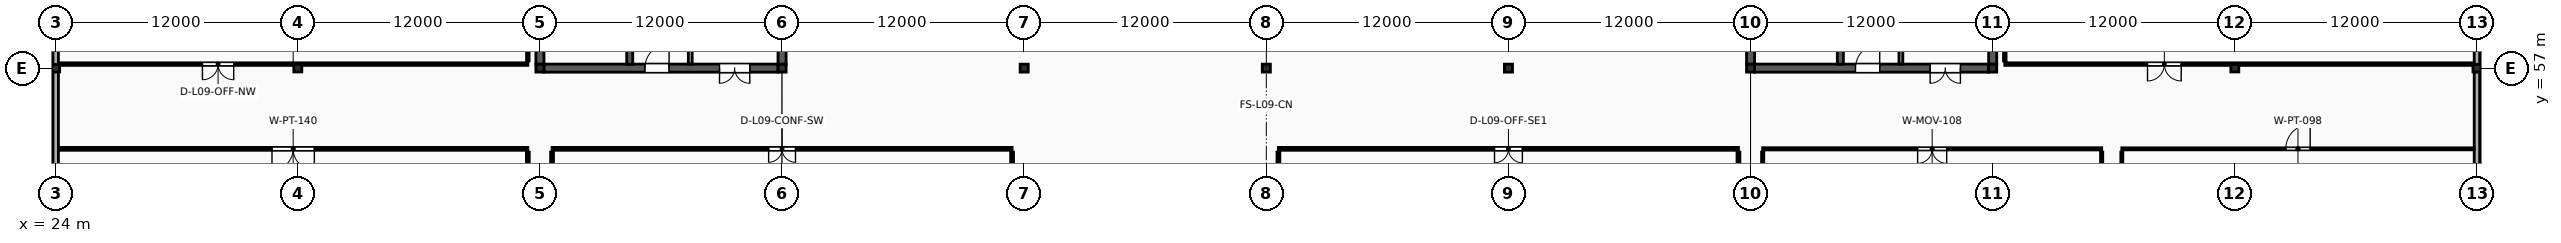
"""IFC4 building model, lengths in metres.
Left out: names, types, materials, properties, quantities, classifications, styles, units other than length and angle.
Written with IfcOpenShell. Run it as: python <this file> out.ifc"""

import sys

from ifc_helpers import new_model, si_unit, direction, frame, frame_2d, origin, origin_2d, place, context, subcontext, project, spatial, rectangle, i_section, extrude, element, fill, save


model = new_model("IFC4")
c1 = context("Model", 3, precision=1e-05, world=origin(), true_north=direction((0.0, 1.0)))
c2 = subcontext(c1, "Body", "Model", "MODEL_VIEW")
j1 = project(units=[si_unit("LENGTHUNIT", "METRE"), si_unit("PLANEANGLEUNIT", "RADIAN")], contexts=[c1])
p1 = place(None, origin())
s1 = spatial("IfcSite", under=j1, at=p1, CompositionType="ELEMENT")
p2 = place(p1, origin())
s2 = spatial("IfcBuilding", under=s1, at=p2, CompositionType="ELEMENT")
p3 = place(p2, frame((0.0, 0.0, 37.6)))
s3 = spatial("IfcBuildingStorey", under=s2, at=p3, CompositionType="ELEMENT", Elevation=37.6)
for number, where, z_axis, x_axis in (
    (1, (24.0, 57.0, 0.0), (0.0, 0.0, 1.0), (1.0, 0.0, 0.0)),
    (2, (36.0, 57.0, 0.0), (0.0, 0.0, 1.0), (1.0, 0.0, 0.0)),
):
    element("IfcColumn", number, at=place(p3, frame(where, z_axis=z_axis, x_axis=x_axis)), inside=s3, PredefinedType="COLUMN", context=c2, shape_type="SweptSolid", body=[
        extrude(i_section(OverallWidth=0.394, OverallDepth=0.375, WebThickness=0.017, FlangeThickness=0.028, FilletRadius=0.018, at=origin_2d()), origin(), (0.0, 0.0, 1.0), 4.0),
    ])
for number, where, z_axis, x_axis in (
    (3, (48.0, 57.0, 0.0), (0.0, 0.0, 1.0), (1.0, 0.0, 0.0)),
    (4, (60.0, 57.0, 0.0), (0.0, 0.0, 1.0), (1.0, 0.0, 0.0)),
    (5, (72.0, 57.0, 0.0), (0.0, 0.0, 1.0), (1.0, 0.0, 0.0)),
    (6, (84.0, 57.0, 0.0), (0.0, 0.0, 1.0), (1.0, 0.0, 0.0)),
    (7, (96.0, 57.0, 0.0), (0.0, 0.0, 1.0), (1.0, 0.0, 0.0)),
    (8, (108.0, 57.0, 0.0), (0.0, 0.0, 1.0), (1.0, 0.0, 0.0)),
    (9, (120.0, 57.0, 0.0), (0.0, 0.0, 1.0), (1.0, 0.0, 0.0)),
):
    element("IfcColumn", number, at=place(p3, frame(where, z_axis=z_axis, x_axis=x_axis)), inside=s3, PredefinedType="COLUMN", context=c2, shape_type="SweptSolid", body=[
        extrude(i_section(OverallWidth=0.399, OverallDepth=0.393, WebThickness=0.023, FlangeThickness=0.037, FilletRadius=0.018, at=origin_2d()), origin(), (0.0, 0.0, 1.0), 4.0),
    ])
for number, where, z_axis, x_axis in (
    (10, (132.0, 57.0, 0.0), (0.0, 0.0, 1.0), (1.0, 0.0, 0.0)),
    (11, (144.0, 57.0, 0.0), (0.0, 0.0, 1.0), (1.0, 0.0, 0.0)),
):
    element("IfcColumn", number, at=place(p3, frame(where, z_axis=z_axis, x_axis=x_axis)), inside=s3, PredefinedType="COLUMN", context=c2, shape_type="SweptSolid", body=[
        extrude(i_section(OverallWidth=0.394, OverallDepth=0.375, WebThickness=0.017, FlangeThickness=0.028, FilletRadius=0.018, at=origin_2d()), origin(), (0.0, 0.0, 1.0), 4.0),
    ])
p4 = place(p3, frame((48.197, 57.0, 0.0), z_axis=(0.0, 0.0, 1.0), x_axis=(1.0, 0.0, 0.0)))
e12 = element("IfcWall", 12, at=p4, inside=s3, PredefinedType="SHEAR", context=c2, shape_type="SweptSolid", body=[
    extrude(rectangle(XDim=11.607, YDim=0.4, at=frame_2d((5.803, 0.0))), origin(), (0.0, 0.0, 1.0), 3.838),
])
p5 = place(p4, frame((5.004, 0.0, 0.0)))
e13 = element("IfcOpeningElement", 13, at=p5, cuts=e12, PredefinedType="OPENING", context=c2, shape_type="SweptSolid", body=[
    extrude(rectangle(XDim=1.2, YDim=2.2, at=frame_2d((0.6, 1.1))), frame((0.0, 0.215, 0.0), z_axis=(0.0, -1.0, 0.0), x_axis=(1.0, 0.0, 0.0)), (0.0, 0.0, 1.0), 0.43),
])
p6 = place(p4, frame((8.703, 0.0, 0.0)))
e14 = element("IfcOpeningElement", 14, at=p6, cuts=e12, PredefinedType="OPENING", context=c2, shape_type="SweptSolid", body=[
    extrude(rectangle(XDim=1.5, YDim=2.25, at=frame_2d((0.75, 1.125))), frame((0.0, 0.215, 0.0), z_axis=(0.0, -1.0, 0.0), x_axis=(1.0, 0.0, 0.0)), (0.0, 0.0, 1.0), 0.43),
])
for number, where, z_axis, x_axis in (
    (15, (48.0, 57.194, 0.0), (0.0, 0.0, 1.0), (0.0, 1.0, 0.0)),
    (16, (60.0, 57.194, 0.0), (0.0, 0.0, 1.0), (0.0, 1.0, 0.0)),
):
    element("IfcWall", number, at=place(p3, frame(where, z_axis=z_axis, x_axis=x_axis)), inside=s3, PredefinedType="SHEAR", context=c2, shape_type="SweptSolid", body=[
        extrude(rectangle(XDim=11.613, YDim=0.4, at=frame_2d((5.806, 0.0))), origin(), (0.0, 0.0, 1.0), 3.838),
    ])
p7 = place(p3, frame((52.45, 57.197, 0.0), z_axis=(0.0, 0.0, 1.0), x_axis=(0.0, 1.0, 0.0)))
e17 = element("IfcWall", 17, at=p7, inside=s3, PredefinedType="SHEAR", context=c2, shape_type="SweptSolid", body=[
    extrude(rectangle(XDim=11.606, YDim=0.3, at=frame_2d((5.803, 0.0))), origin(), (0.0, 0.0, 1.0), 3.838),
])
p8 = place(p7, frame((0.9, 0.0, 0.0)))
e18 = element("IfcOpeningElement", 18, at=p8, cuts=e17, PredefinedType="OPENING", context=c2, shape_type="SweptSolid", body=[
    extrude(rectangle(XDim=1.1, YDim=2.2, at=frame_2d((0.55, 1.1))), frame((0.0, 0.165, 0.0), z_axis=(0.0, -1.0, 0.0), x_axis=(1.0, 0.0, 0.0)), (0.0, 0.0, 1.0), 0.33),
])
p9 = place(p3, frame((55.45, 57.2, 0.0), z_axis=(0.0, 0.0, 1.0), x_axis=(0.0, 1.0, 0.0)))
e19 = element("IfcWall", 19, at=p9, inside=s3, PredefinedType="SOLIDWALL", context=c2, shape_type="SweptSolid", body=[
    extrude(rectangle(XDim=8.48, YDim=0.19, at=frame_2d((4.24, 0.0))), origin(), (0.0, 0.0, 1.0), 3.828),
])
p10 = place(p9, frame((3.6, 0.0, 0.0)))
e20 = element("IfcOpeningElement", 20, at=p10, cuts=e19, PredefinedType="OPENING", context=c2, shape_type="SweptSolid", body=[
    extrude(rectangle(XDim=1.04, YDim=2.18, at=frame_2d((0.52, 1.09))), frame((0.0, 0.11, 0.0), z_axis=(0.0, -1.0, 0.0), x_axis=(1.0, 0.0, 0.0)), (0.0, 0.0, 1.0), 0.22),
])
p11 = place(p3, frame((108.197, 57.0, 0.0), z_axis=(0.0, 0.0, 1.0), x_axis=(1.0, 0.0, 0.0)))
e21 = element("IfcWall", 21, at=p11, inside=s3, PredefinedType="SHEAR", context=c2, shape_type="SweptSolid", body=[
    extrude(rectangle(XDim=11.607, YDim=0.4, at=frame_2d((5.803, 0.0))), origin(), (0.0, 0.0, 1.0), 3.838),
])
p12 = place(p11, frame((5.004, 0.0, 0.0)))
e22 = element("IfcOpeningElement", 22, at=p12, cuts=e21, PredefinedType="OPENING", context=c2, shape_type="SweptSolid", body=[
    extrude(rectangle(XDim=1.2, YDim=2.2, at=frame_2d((0.6, 1.1))), frame((0.0, 0.215, 0.0), z_axis=(0.0, -1.0, 0.0), x_axis=(1.0, 0.0, 0.0)), (0.0, 0.0, 1.0), 0.43),
])
p13 = place(p11, frame((8.704, 0.0, 0.0)))
e23 = element("IfcOpeningElement", 23, at=p13, cuts=e21, PredefinedType="OPENING", context=c2, shape_type="SweptSolid", body=[
    extrude(rectangle(XDim=1.5, YDim=2.25, at=frame_2d((0.75, 1.125))), frame((0.0, 0.215, 0.0), z_axis=(0.0, -1.0, 0.0), x_axis=(1.0, 0.0, 0.0)), (0.0, 0.0, 1.0), 0.43),
])
for number, where, z_axis, x_axis in (
    (24, (108.0, 57.194, 0.0), (0.0, 0.0, 1.0), (0.0, 1.0, 0.0)),
    (25, (120.0, 57.194, 0.0), (0.0, 0.0, 1.0), (0.0, 1.0, 0.0)),
):
    element("IfcWall", number, at=place(p3, frame(where, z_axis=z_axis, x_axis=x_axis)), inside=s3, PredefinedType="SHEAR", context=c2, shape_type="SweptSolid", body=[
        extrude(rectangle(XDim=11.613, YDim=0.4, at=frame_2d((5.806, 0.0))), origin(), (0.0, 0.0, 1.0), 3.838),
    ])
p14 = place(p3, frame((112.45, 57.197, 0.0), z_axis=(0.0, 0.0, 1.0), x_axis=(0.0, 1.0, 0.0)))
e26 = element("IfcWall", 26, at=p14, inside=s3, PredefinedType="SHEAR", context=c2, shape_type="SweptSolid", body=[
    extrude(rectangle(XDim=11.606, YDim=0.3, at=frame_2d((5.803, 0.0))), origin(), (0.0, 0.0, 1.0), 3.838),
])
p15 = place(p14, frame((0.9, 0.0, 0.0)))
e27 = element("IfcOpeningElement", 27, at=p15, cuts=e26, PredefinedType="OPENING", context=c2, shape_type="SweptSolid", body=[
    extrude(rectangle(XDim=1.1, YDim=2.2, at=frame_2d((0.55, 1.1))), frame((0.0, 0.165, 0.0), z_axis=(0.0, -1.0, 0.0), x_axis=(1.0, 0.0, 0.0)), (0.0, 0.0, 1.0), 0.33),
])
p16 = place(p3, frame((115.45, 57.2, 0.0), z_axis=(0.0, 0.0, 1.0), x_axis=(0.0, 1.0, 0.0)))
e28 = element("IfcWall", 28, at=p16, inside=s3, PredefinedType="SOLIDWALL", context=c2, shape_type="SweptSolid", body=[
    extrude(rectangle(XDim=8.48, YDim=0.19, at=frame_2d((4.24, 0.0))), origin(), (0.0, 0.0, 1.0), 3.828),
])
p17 = place(p16, frame((3.6, 0.0, 0.0)))
e29 = element("IfcOpeningElement", 29, at=p17, cuts=e28, PredefinedType="OPENING", context=c2, shape_type="SweptSolid", body=[
    extrude(rectangle(XDim=1.04, YDim=2.18, at=frame_2d((0.52, 1.09))), frame((0.0, 0.11, 0.0), z_axis=(0.0, -1.0, 0.0), x_axis=(1.0, 0.0, 0.0)), (0.0, 0.0, 1.0), 0.22),
])
p18 = place(p3, frame((24.0, 45.186, 0.0), z_axis=(0.0, 0.0, 1.0), x_axis=(0.0, 1.0, 0.0)))
e30 = element("IfcWall", 30, at=p18, inside=s3, PredefinedType="SOLIDWALL", context=c2, shape_type="SweptSolid", body=[
    extrude(rectangle(XDim=11.629, YDim=0.27, at=frame_2d((5.814, 0.0))), origin(), (0.0, 0.0, 1.0), 3.291),
])
p19 = place(p18, frame((4.994, 0.0, 0.78)))
e31 = element("IfcOpeningElement", 31, at=p19, cuts=e30, PredefinedType="OPENING", context=c2, shape_type="SweptSolid", body=[
    extrude(rectangle(XDim=1.64, YDim=1.74, at=frame_2d((0.82, 0.87))), frame((0.0, 0.15, 0.0), z_axis=(0.0, -1.0, 0.0), x_axis=(1.0, 0.0, 0.0)), (0.0, 0.0, 1.0), 0.3),
])
p20 = place(p3, frame((24.0, 57.186, 0.0), z_axis=(0.0, 0.0, 1.0), x_axis=(0.0, 1.0, 0.0)))
e32 = element("IfcWall", 32, at=p20, inside=s3, PredefinedType="SOLIDWALL", context=c2, shape_type="SweptSolid", body=[
    extrude(rectangle(XDim=11.629, YDim=0.27, at=frame_2d((5.814, 0.0))), origin(), (0.0, 0.0, 1.0), 3.291),
])
p21 = place(p20, frame((4.885, 0.0, 0.78)))
e33 = element("IfcOpeningElement", 33, at=p21, cuts=e32, PredefinedType="OPENING", context=c2, shape_type="SweptSolid", body=[
    extrude(rectangle(XDim=1.86, YDim=1.74, at=frame_2d((0.93, 0.87))), frame((0.0, 0.15, 0.0), z_axis=(0.0, -1.0, 0.0), x_axis=(1.0, 0.0, 0.0)), (0.0, 0.0, 1.0), 0.3),
])
p22 = place(p3, frame((144.0, 45.186, 0.0), z_axis=(0.0, 0.0, 1.0), x_axis=(0.0, 1.0, 0.0)))
e34 = element("IfcWall", 34, at=p22, inside=s3, PredefinedType="SOLIDWALL", context=c2, shape_type="SweptSolid", body=[
    extrude(rectangle(XDim=11.629, YDim=0.27, at=frame_2d((5.814, 0.0))), origin(), (0.0, 0.0, 1.0), 3.291),
])
p23 = place(p22, frame((4.704, 0.0, 0.78)))
e35 = element("IfcOpeningElement", 35, at=p23, cuts=e34, PredefinedType="OPENING", context=c2, shape_type="SweptSolid", body=[
    extrude(rectangle(XDim=2.22, YDim=1.74, at=frame_2d((1.11, 0.87))), frame((0.0, 0.15, 0.0), z_axis=(0.0, -1.0, 0.0), x_axis=(1.0, 0.0, 0.0)), (0.0, 0.0, 1.0), 0.3),
])
p24 = place(p3, frame((144.0, 57.186, 0.0), z_axis=(0.0, 0.0, 1.0), x_axis=(0.0, 1.0, 0.0)))
e36 = element("IfcWall", 36, at=p24, inside=s3, PredefinedType="SOLIDWALL", context=c2, shape_type="SweptSolid", body=[
    extrude(rectangle(XDim=11.629, YDim=0.27, at=frame_2d((5.814, 0.0))), origin(), (0.0, 0.0, 1.0), 3.291),
])
p25 = place(p24, frame((4.614, 0.0, 0.78)))
e37 = element("IfcOpeningElement", 37, at=p25, cuts=e36, PredefinedType="OPENING", context=c2, shape_type="SweptSolid", body=[
    extrude(rectangle(XDim=2.4, YDim=1.74, at=frame_2d((1.2, 0.87))), frame((0.0, 0.15, 0.0), z_axis=(0.0, -1.0, 0.0), x_axis=(1.0, 0.0, 0.0)), (0.0, 0.0, 1.0), 0.3),
])
p26 = place(p3, frame((24.14, 53.0, 0.0), z_axis=(0.0, 0.0, 1.0), x_axis=(1.0, 0.0, 0.0)))
e38 = element("IfcWall", 38, at=p26, inside=s3, PredefinedType="PARTITIONING", context=c2, shape_type="SweptSolid", body=[
    extrude(rectangle(XDim=23.26, YDim=0.14, at=frame_2d((11.63, 0.0))), origin(), (0.0, 0.0, 1.0), 2.88),
])
p27 = place(p26, frame((10.58, 0.0, 0.0)))
e39 = element("IfcOpeningElement", 39, at=p27, cuts=e38, PredefinedType="OPENING", context=c2, shape_type="SweptSolid", body=[
    extrude(rectangle(XDim=2.1, YDim=2.47, at=frame_2d((1.05, 1.235))), frame((0.0, 0.085, 0.0), z_axis=(0.0, -1.0, 0.0), x_axis=(1.0, 0.0, 0.0)), (0.0, 0.0, 1.0), 0.17),
])
p28 = place(p3, frame((47.4, 27.14, 0.0), z_axis=(0.0, 0.0, 1.0), x_axis=(0.0, 1.0, 0.0)))
e40 = element("IfcWall", 40, at=p28, inside=s3, PredefinedType="PARTITIONING", context=c2, shape_type="SweptSolid", body=[
    extrude(rectangle(XDim=25.7, YDim=0.14, at=frame_2d((12.85, 0.0))), origin(), (0.0, 0.0, 1.0), 2.88),
])
p29 = place(p3, frame((48.6, 53.0, 0.0), z_axis=(0.0, 0.0, 1.0), x_axis=(1.0, 0.0, 0.0)))
e41 = element("IfcWall", 41, at=p29, inside=s3, PredefinedType="PARTITIONING", context=c2, shape_type="SweptSolid", body=[
    extrude(rectangle(XDim=22.8, YDim=0.14, at=frame_2d((11.4, 0.0))), origin(), (0.0, 0.0, 1.0), 2.88),
])
p30 = place(p29, frame((10.735, 0.0, 0.0)))
e42 = element("IfcOpeningElement", 42, at=p30, cuts=e41, PredefinedType="OPENING", context=c2, shape_type="SweptSolid", body=[
    extrude(rectangle(XDim=1.33, YDim=2.2, at=frame_2d((0.665, 1.1))), frame((0.0, 0.085, 0.0), z_axis=(0.0, -1.0, 0.0), x_axis=(1.0, 0.0, 0.0)), (0.0, 0.0, 1.0), 0.17),
])
for number, where, z_axis, x_axis in (
    (43, (48.6, 27.14, 0.0), (0.0, 0.0, 1.0), (0.0, 1.0, 0.0)),
    (44, (71.4, 27.14, 0.0), (0.0, 0.0, 1.0), (0.0, 1.0, 0.0)),
):
    element("IfcWall", number, at=place(p3, frame(where, z_axis=z_axis, x_axis=x_axis)), inside=s3, PredefinedType="PARTITIONING", context=c2, shape_type="SweptSolid", body=[
        extrude(rectangle(XDim=25.7, YDim=0.14, at=frame_2d((12.85, 0.0))), origin(), (0.0, 0.0, 1.0), 2.88),
    ])
p31 = place(p3, frame((84.6, 53.0, 0.0), z_axis=(0.0, 0.0, 1.0), x_axis=(1.0, 0.0, 0.0)))
e45 = element("IfcWall", 45, at=p31, inside=s3, PredefinedType="PARTITIONING", context=c2, shape_type="SweptSolid", body=[
    extrude(rectangle(XDim=22.8, YDim=0.14, at=frame_2d((11.4, 0.0))), origin(), (0.0, 0.0, 1.0), 2.88),
])
p32 = place(p31, frame((10.71, 0.0, 0.0)))
e46 = element("IfcOpeningElement", 46, at=p32, cuts=e45, PredefinedType="OPENING", context=c2, shape_type="SweptSolid", body=[
    extrude(rectangle(XDim=1.38, YDim=2.23, at=frame_2d((0.69, 1.115))), frame((0.0, 0.085, 0.0), z_axis=(0.0, -1.0, 0.0), x_axis=(1.0, 0.0, 0.0)), (0.0, 0.0, 1.0), 0.17),
])
for number, where, z_axis, x_axis in (
    (47, (84.6, 27.14, 0.0), (0.0, 0.0, 1.0), (0.0, 1.0, 0.0)),
    (48, (107.4, 27.14, 0.0), (0.0, 0.0, 1.0), (0.0, 1.0, 0.0)),
):
    element("IfcWall", number, at=place(p3, frame(where, z_axis=z_axis, x_axis=x_axis)), inside=s3, PredefinedType="PARTITIONING", context=c2, shape_type="SweptSolid", body=[
        extrude(rectangle(XDim=25.7, YDim=0.14, at=frame_2d((12.85, 0.0))), origin(), (0.0, 0.0, 1.0), 2.88),
    ])
p33 = place(p3, frame((108.6, 53.0, 0.0), z_axis=(0.0, 0.0, 1.0), x_axis=(1.0, 0.0, 0.0)))
e49 = element("IfcWall", 49, at=p33, inside=s3, PredefinedType="MOVABLE", context=c2, shape_type="SweptSolid", body=[
    extrude(rectangle(XDim=16.8, YDim=0.108, at=frame_2d((8.4, 0.0))), origin(), (0.0, 0.0, 1.0), 2.88),
])
p34 = place(p33, frame((7.68, 0.0, 0.0)))
e50 = element("IfcOpeningElement", 50, at=p34, cuts=e49, PredefinedType="OPENING", context=c2, shape_type="SweptSolid", body=[
    extrude(rectangle(XDim=1.44, YDim=2.26, at=frame_2d((0.72, 1.13))), frame((0.0, 0.069, 0.0), z_axis=(0.0, -1.0, 0.0), x_axis=(1.0, 0.0, 0.0)), (0.0, 0.0, 1.0), 0.138),
])
for number, where, z_axis, x_axis in (
    (51, (108.6, 27.14, 0.0), (0.0, 0.0, 1.0), (0.0, 1.0, 0.0)),
    (52, (125.4, 27.14, 0.0), (0.0, 0.0, 1.0), (0.0, 1.0, 0.0)),
):
    element("IfcWall", number, at=place(p3, frame(where, z_axis=z_axis, x_axis=x_axis)), inside=s3, PredefinedType="MOVABLE", context=c2, shape_type="SweptSolid", body=[
        extrude(rectangle(XDim=25.7, YDim=0.108, at=frame_2d((12.85, 0.0))), origin(), (0.0, 0.0, 1.0), 2.88),
    ])
p35 = place(p3, frame((126.4, 53.0, 0.0), z_axis=(0.0, 0.0, 1.0), x_axis=(1.0, 0.0, 0.0)))
e53 = element("IfcWall", 53, at=p35, inside=s3, PredefinedType="PARTITIONING", context=c2, shape_type="SweptSolid", body=[
    extrude(rectangle(XDim=17.46, YDim=0.098, at=frame_2d((8.73, 0.0))), origin(), (0.0, 0.0, 1.0), 2.88),
])
p36 = place(p35, frame((8.125, 0.0, 0.0)))
e54 = element("IfcOpeningElement", 54, at=p36, cuts=e53, PredefinedType="OPENING", context=c2, shape_type="SweptSolid", body=[
    extrude(rectangle(XDim=1.21, YDim=2.25, at=frame_2d((0.605, 1.125))), frame((0.0, 0.064, 0.0), z_axis=(0.0, -1.0, 0.0), x_axis=(1.0, 0.0, 0.0)), (0.0, 0.0, 1.0), 0.128),
])
p37 = place(p3, frame((126.4, 27.14, 0.0), z_axis=(0.0, 0.0, 1.0), x_axis=(0.0, 1.0, 0.0)))
e55 = element("IfcWall", 55, at=p37, inside=s3, PredefinedType="PARTITIONING", context=c2, shape_type="SweptSolid", body=[
    extrude(rectangle(XDim=25.7, YDim=0.098, at=frame_2d((12.85, 0.0))), origin(), (0.0, 0.0, 1.0), 2.88),
])
p38 = place(p3, frame((24.14, 57.2, 0.0), z_axis=(0.0, 0.0, 1.0), x_axis=(1.0, 0.0, 0.0)))
e56 = element("IfcWall", 56, at=p38, inside=s3, PredefinedType="PARTITIONING", context=c2, shape_type="SweptSolid", body=[
    extrude(rectangle(XDim=23.26, YDim=0.125, at=frame_2d((11.63, 0.0))), origin(), (0.0, 0.0, 1.0), 2.88),
])
p39 = place(p38, frame((7.133, 0.0, 0.0)))
e57 = element("IfcOpeningElement", 57, at=p39, cuts=e56, PredefinedType="OPENING", context=c2, shape_type="SweptSolid", body=[
    extrude(rectangle(XDim=1.55, YDim=2.31, at=frame_2d((0.775, 1.155))), frame((0.0, 0.077, 0.0), z_axis=(0.0, -1.0, 0.0), x_axis=(1.0, 0.0, 0.0)), (0.0, 0.0, 1.0), 0.155),
])
p40 = place(p3, frame((47.4, 57.36, 0.0), z_axis=(0.0, 0.0, 1.0), x_axis=(0.0, 1.0, 0.0)))
e58 = element("IfcWall", 58, at=p40, inside=s3, PredefinedType="PARTITIONING", context=c2, shape_type="SweptSolid", body=[
    extrude(rectangle(XDim=11.5, YDim=0.125, at=frame_2d((5.75, 0.0))), origin(), (0.0, 0.0, 1.0), 2.88),
])
p41 = place(p3, frame((120.6, 57.2, 0.0), z_axis=(0.0, 0.0, 1.0), x_axis=(1.0, 0.0, 0.0)))
e59 = element("IfcWall", 59, at=p41, inside=s3, PredefinedType="PARTITIONING", context=c2, shape_type="SweptSolid", body=[
    extrude(rectangle(XDim=23.26, YDim=0.125, at=frame_2d((11.63, 0.0))), origin(), (0.0, 0.0, 1.0), 2.88),
])
p42 = place(p41, frame((7.073, 0.0, 0.0)))
e60 = element("IfcOpeningElement", 60, at=p42, cuts=e59, PredefinedType="OPENING", context=c2, shape_type="SweptSolid", body=[
    extrude(rectangle(XDim=1.67, YDim=2.35, at=frame_2d((0.835, 1.175))), frame((0.0, 0.077, 0.0), z_axis=(0.0, -1.0, 0.0), x_axis=(1.0, 0.0, 0.0)), (0.0, 0.0, 1.0), 0.155),
])
p43 = place(p3, frame((120.6, 57.36, 0.0), z_axis=(0.0, 0.0, 1.0), x_axis=(0.0, 1.0, 0.0)))
e61 = element("IfcWall", 61, at=p43, inside=s3, PredefinedType="PARTITIONING", context=c2, shape_type="SweptSolid", body=[
    extrude(rectangle(XDim=11.5, YDim=0.125, at=frame_2d((5.75, 0.0))), origin(), (0.0, 0.0, 1.0), 2.88),
])
p44 = place(p5, origin())
e62 = element("IfcDoor", 62, at=p44, inside=s3, OperationType="SINGLE_SWING_RIGHT", PredefinedType="DOOR", context=c2, shape_type="SweptSolid", body=[
    extrude(rectangle(XDim=1.2, YDim=2.2, at=frame_2d((0.6, 1.1))), frame((0.0, 0.025, 0.0), z_axis=(0.0, -1.0, 0.0), x_axis=(1.0, 0.0, 0.0)), (0.0, 0.0, 1.0), 0.05),
])
fill(e13, e62)
p45 = place(p6, origin())
e63 = element("IfcDoor", 63, at=p45, inside=s3, OperationType="DOUBLE_DOOR_SINGLE_SWING", PredefinedType="DOOR", context=c2, shape_type="SweptSolid", body=[
    extrude(rectangle(XDim=1.5, YDim=2.25, at=frame_2d((0.75, 1.125))), frame((0.0, 0.025, 0.0), z_axis=(0.0, -1.0, 0.0), x_axis=(1.0, 0.0, 0.0)), (0.0, 0.0, 1.0), 0.05),
])
fill(e14, e63)
p46 = place(p12, origin())
e64 = element("IfcDoor", 64, at=p46, inside=s3, OperationType="SINGLE_SWING_RIGHT", PredefinedType="DOOR", context=c2, shape_type="SweptSolid", body=[
    extrude(rectangle(XDim=1.2, YDim=2.2, at=frame_2d((0.6, 1.1))), frame((0.0, 0.025, 0.0), z_axis=(0.0, -1.0, 0.0), x_axis=(1.0, 0.0, 0.0)), (0.0, 0.0, 1.0), 0.05),
])
fill(e22, e64)
p47 = place(p13, origin())
e65 = element("IfcDoor", 65, at=p47, inside=s3, OperationType="DOUBLE_DOOR_SINGLE_SWING", PredefinedType="DOOR", context=c2, shape_type="SweptSolid", body=[
    extrude(rectangle(XDim=1.5, YDim=2.25, at=frame_2d((0.75, 1.125))), frame((0.0, 0.025, 0.0), z_axis=(0.0, -1.0, 0.0), x_axis=(1.0, 0.0, 0.0)), (0.0, 0.0, 1.0), 0.05),
])
fill(e23, e65)
p48 = place(p27, origin())
e66 = element("IfcDoor", 66, at=p48, inside=s3, OperationType="DOUBLE_DOOR_SINGLE_SWING", PredefinedType="DOOR", context=c2, shape_type="SweptSolid", body=[
    extrude(rectangle(XDim=2.1, YDim=2.47, at=frame_2d((1.05, 1.235))), frame((0.0, 0.025, 0.0), z_axis=(0.0, -1.0, 0.0), x_axis=(1.0, 0.0, 0.0)), (0.0, 0.0, 1.0), 0.05),
])
fill(e39, e66)
p49 = place(p30, origin())
e67 = element("IfcDoor", 67, at=p49, inside=s3, OperationType="DOUBLE_DOOR_SINGLE_SWING", PredefinedType="DOOR", context=c2, shape_type="SweptSolid", body=[
    extrude(rectangle(XDim=1.33, YDim=2.2, at=frame_2d((0.665, 1.1))), frame((0.0, 0.025, 0.0), z_axis=(0.0, -1.0, 0.0), x_axis=(1.0, 0.0, 0.0)), (0.0, 0.0, 1.0), 0.05),
])
fill(e42, e67)
p50 = place(p32, origin())
e68 = element("IfcDoor", 68, at=p50, inside=s3, OperationType="DOUBLE_DOOR_SINGLE_SWING", PredefinedType="DOOR", context=c2, shape_type="SweptSolid", body=[
    extrude(rectangle(XDim=1.38, YDim=2.23, at=frame_2d((0.69, 1.115))), frame((0.0, 0.025, 0.0), z_axis=(0.0, -1.0, 0.0), x_axis=(1.0, 0.0, 0.0)), (0.0, 0.0, 1.0), 0.05),
])
fill(e46, e68)
p51 = place(p34, origin())
e69 = element("IfcDoor", 69, at=p51, inside=s3, OperationType="DOUBLE_DOOR_SINGLE_SWING", PredefinedType="DOOR", context=c2, shape_type="SweptSolid", body=[
    extrude(rectangle(XDim=1.44, YDim=2.26, at=frame_2d((0.72, 1.13))), frame((0.0, 0.025, 0.0), z_axis=(0.0, -1.0, 0.0), x_axis=(1.0, 0.0, 0.0)), (0.0, 0.0, 1.0), 0.05),
])
fill(e50, e69)
p52 = place(p36, origin())
e70 = element("IfcDoor", 70, at=p52, inside=s3, OperationType="SINGLE_SWING_RIGHT", PredefinedType="DOOR", context=c2, shape_type="SweptSolid", body=[
    extrude(rectangle(XDim=1.21, YDim=2.25, at=frame_2d((0.605, 1.125))), frame((0.0, 0.025, 0.0), z_axis=(0.0, -1.0, 0.0), x_axis=(1.0, 0.0, 0.0)), (0.0, 0.0, 1.0), 0.05),
])
fill(e54, e70)
p53 = place(p39, origin())
e71 = element("IfcDoor", 71, at=p53, inside=s3, OperationType="DOUBLE_DOOR_SINGLE_SWING", PredefinedType="DOOR", context=c2, shape_type="SweptSolid", body=[
    extrude(rectangle(XDim=1.55, YDim=2.31, at=frame_2d((0.775, 1.155))), frame((0.0, 0.025, 0.0), z_axis=(0.0, -1.0, 0.0), x_axis=(1.0, 0.0, 0.0)), (0.0, 0.0, 1.0), 0.05),
])
fill(e57, e71)
p54 = place(p42, origin())
e72 = element("IfcDoor", 72, at=p54, inside=s3, OperationType="DOUBLE_DOOR_SINGLE_SWING", PredefinedType="DOOR", context=c2, shape_type="SweptSolid", body=[
    extrude(rectangle(XDim=1.67, YDim=2.35, at=frame_2d((0.835, 1.175))), frame((0.0, 0.025, 0.0), z_axis=(0.0, -1.0, 0.0), x_axis=(1.0, 0.0, 0.0)), (0.0, 0.0, 1.0), 0.05),
])
fill(e60, e72)
save(model, sys.argv[1])
